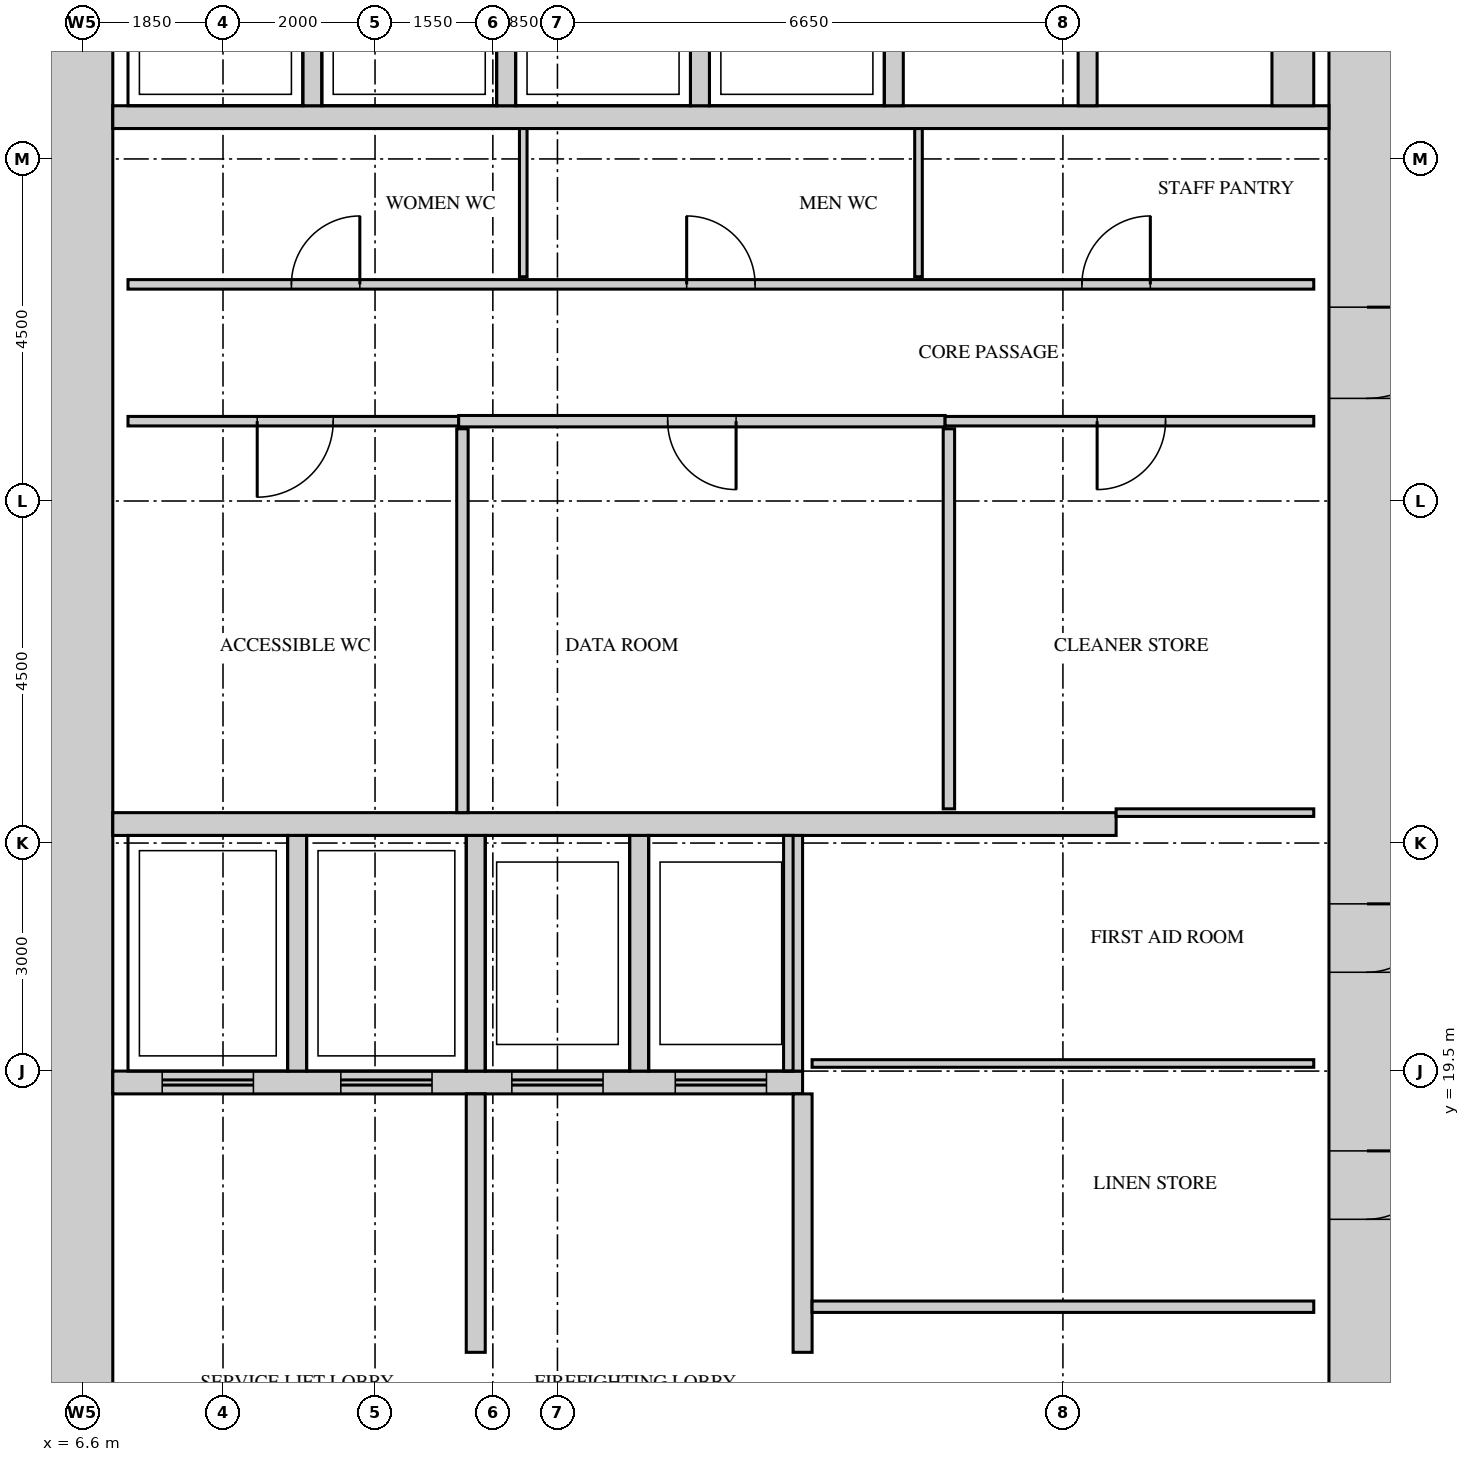
"""IFC4 building model, lengths in metres.
Left out: names, types, materials, properties, quantities, classifications, styles, units other than length and angle.
Written with IfcOpenShell. Run it as: python <this file> out.ifc"""

import sys

from ifc_helpers import new_model, si_unit, direction, frame, frame_2d, origin, place, context, subcontext, project, spatial, rectangle, extrude, source, transform, mapped, element, fill, save


model = new_model("IFC4")
c1 = context("Model", 3, precision=1e-05, world=origin(), true_north=direction((0.0, 1.0)))
c2 = subcontext(c1, "Body", "Model", "MODEL_VIEW")
j1 = project(units=[si_unit("LENGTHUNIT", "METRE"), si_unit("PLANEANGLEUNIT", "RADIAN")], contexts=[c1])
p1 = place(None, origin())
s1 = spatial("IfcSite", under=j1, at=p1, CompositionType="ELEMENT")
p2 = place(p1, origin())
s2 = spatial("IfcBuilding", under=s1, at=p2, CompositionType="ELEMENT")
p3 = place(p2, frame((0.0, 0.0, 132.3)))
s3 = spatial("IfcBuildingStorey", under=s2, at=p3, CompositionType="ELEMENT", Elevation=132.3)
m1 = source(origin(), c2, "Body", "SweptSolid", [
    extrude(rectangle(XDim=28.0, YDim=1.0, at=frame_2d((14.0, 0.0))), origin(), (0.0, 0.0, 1.0), 4.1),
])
p4 = place(p3, frame((23.5, 13.0, 0.0), z_axis=(0.0, 0.0, 1.0), x_axis=(0.0, 1.0, 0.0)))
e1 = element("IfcWall", 1, at=p4, inside=s3, PredefinedType="SHEAR", context=c2, shape_type="MappedRepresentation", body=[
    mapped(m1, transform((0.0, 0.0, 0.0))),
])
m2 = source(origin(), c2, "Body", "SweptSolid", [
    extrude(rectangle(XDim=1.8, YDim=2.1, at=frame_2d((0.9, 1.05))), frame((0.0, 0.51, 0.0), z_axis=(0.0, -1.0, 0.0), x_axis=(1.0, 0.0, 0.0)), (0.0, 0.0, 1.0), 1.02),
])
p5 = place(p4, frame((22.6, 0.0, 0.0)))
e2 = element("IfcOpeningElement", 2, at=p5, cuts=e1, PredefinedType="OPENING", context=c2, shape_type="MappedRepresentation", body=[
    mapped(m2, transform((0.0, 0.0, 0.0))),
])
m3 = source(origin(), c2, "Body", "SweptSolid", [
    extrude(rectangle(XDim=1.2, YDim=2.1, at=frame_2d((0.6, 1.05))), frame((0.0, 0.51, 0.0), z_axis=(0.0, -1.0, 0.0), x_axis=(1.0, 0.0, 0.0)), (0.0, 0.0, 1.0), 1.02),
])
p6 = place(p4, frame((15.35, 0.0, 0.0)))
e3 = element("IfcOpeningElement", 3, at=p6, cuts=e1, PredefinedType="OPENING", context=c2, shape_type="MappedRepresentation", body=[
    mapped(m3, transform((0.0, 0.0, 0.0))),
])
m4 = source(origin(), c2, "Body", "SweptSolid", [
    extrude(rectangle(XDim=0.9, YDim=2.1, at=frame_2d((0.45, 1.05))), frame((0.0, 0.51, 0.0), z_axis=(0.0, -1.0, 0.0), x_axis=(1.0, 0.0, 0.0)), (0.0, 0.0, 1.0), 1.02),
])
p7 = place(p4, frame((1.35, 0.0, 0.0)))
e4 = element("IfcOpeningElement", 4, at=p7, cuts=e1, PredefinedType="OPENING", context=c2, shape_type="MappedRepresentation", body=[
    mapped(m4, transform((0.0, 0.0, 0.0))),
])
p8 = place(p4, frame((4.55, 0.0, 0.0)))
e5 = element("IfcOpeningElement", 5, at=p8, cuts=e1, PredefinedType="OPENING", context=c2, shape_type="MappedRepresentation", body=[
    mapped(m4, transform((0.0, 0.0, 0.0))),
])
p9 = place(p4, frame((7.8, 0.0, 0.0)))
e6 = element("IfcOpeningElement", 6, at=p9, cuts=e1, PredefinedType="OPENING", context=c2, shape_type="MappedRepresentation", body=[
    mapped(m4, transform((0.0, 0.0, 0.0))),
])
p10 = place(p3, frame((6.5, 13.0, 0.0), z_axis=(0.0, 0.0, 1.0), x_axis=(0.0, 1.0, 0.0)))
e7 = element("IfcWall", 7, at=p10, inside=s3, PredefinedType="SHEAR", context=c2, shape_type="MappedRepresentation", body=[
    mapped(m1, transform((0.0, 0.0, 0.0))),
])
m5 = source(origin(), c2, "Body", "SweptSolid", [
    extrude(rectangle(XDim=13.2, YDim=0.3, at=frame_2d((6.6, 0.0))), origin(), (0.0, 0.0, 1.0), 4.1),
])
p11 = place(p3, frame((7.0, 22.75, 0.0), z_axis=(0.0, 0.0, 1.0), x_axis=(1.0, 0.0, 0.0)))
e8 = element("IfcWall", 8, at=p11, inside=s3, PredefinedType="STANDARD", context=c2, shape_type="MappedRepresentation", body=[
    mapped(m5, transform((0.0, 0.0, 0.0))),
])
m6 = source(origin(), c2, "Body", "SweptSolid", [
    extrude(rectangle(XDim=9.075, YDim=0.3, at=frame_2d((4.538, 0.0))), origin(), (0.0, 0.0, 1.0), 4.1),
])
p12 = place(p3, frame((7.0, 19.35, 0.0), z_axis=(0.0, 0.0, 1.0), x_axis=(1.0, 0.0, 0.0)))
e9 = element("IfcWall", 9, at=p12, inside=s3, PredefinedType="STANDARD", context=c2, shape_type="MappedRepresentation", body=[
    mapped(m6, transform((0.0, 0.0, 0.0))),
])
m7 = source(origin(), c2, "Body", "SweptSolid", [
    extrude(rectangle(XDim=1.2, YDim=2.1, at=frame_2d((0.6, 1.05))), frame((0.0, 0.16, 0.0), z_axis=(0.0, -1.0, 0.0), x_axis=(1.0, 0.0, 0.0)), (0.0, 0.0, 1.0), 0.32),
])
p13 = place(p12, frame((0.65, 0.0, 0.0)))
e10 = element("IfcOpeningElement", 10, at=p13, cuts=e9, PredefinedType="OPENING", context=c2, shape_type="MappedRepresentation", body=[
    mapped(m7, transform((0.0, 0.0, 0.0))),
])
p14 = place(p12, frame((3.0, 0.0, 0.0)))
e11 = element("IfcOpeningElement", 11, at=p14, cuts=e9, PredefinedType="OPENING", context=c2, shape_type="MappedRepresentation", body=[
    mapped(m7, transform((0.0, 0.0, 0.0))),
])
p15 = place(p12, frame((5.25, 0.0, 0.0)))
e12 = element("IfcOpeningElement", 12, at=p15, cuts=e9, PredefinedType="OPENING", context=c2, shape_type="MappedRepresentation", body=[
    mapped(m7, transform((0.0, 0.0, 0.0))),
])
p16 = place(p12, frame((7.4, 0.0, 0.0)))
e13 = element("IfcOpeningElement", 13, at=p16, cuts=e9, PredefinedType="OPENING", context=c2, shape_type="MappedRepresentation", body=[
    mapped(m7, transform((0.0, 0.0, 0.0))),
])
m8 = source(origin(), c2, "Body", "SweptSolid", [
    extrude(rectangle(XDim=16.0, YDim=0.3, at=frame_2d((8.0, 0.0))), origin(), (0.0, 0.0, 1.0), 4.1),
])
p17 = place(p3, frame((7.0, 32.05, 0.0), z_axis=(0.0, 0.0, 1.0), x_axis=(1.0, 0.0, 0.0)))
e14 = element("IfcWall", 14, at=p17, inside=s3, PredefinedType="STANDARD", context=c2, shape_type="MappedRepresentation", body=[
    mapped(m8, transform((0.0, 0.0, 0.0))),
])
m9 = source(origin(), c2, "Body", "SweptSolid", [
    extrude(rectangle(XDim=3.1, YDim=0.25, at=frame_2d((1.55, 0.0))), origin(), (0.0, 0.0, 1.0), 4.1),
])
for number, where, z_axis, x_axis in (
    (15, (9.425, 19.5, 0.0), (0.0, 0.0, 1.0), (0.0, 1.0, 0.0)),
    (16, (11.775, 19.5, 0.0), (0.0, 0.0, 1.0), (0.0, 1.0, 0.0)),
    (17, (13.925, 19.5, 0.0), (0.0, 0.0, 1.0), (0.0, 1.0, 0.0)),
    (18, (15.95, 19.5, 0.0), (0.0, 0.0, 1.0), (0.0, 1.0, 0.0)),
):
    element("IfcWall", number, at=place(p3, frame(where, z_axis=z_axis, x_axis=x_axis)), inside=s3, PredefinedType="STANDARD", context=c2, shape_type="MappedRepresentation", body=[
        mapped(m9, transform((0.0, 0.0, 0.0))),
    ])
m10 = source(origin(), c2, "Body", "SweptSolid", [
    extrude(rectangle(XDim=2.4, YDim=0.25, at=frame_2d((1.2, 0.0))), origin(), (0.0, 0.0, 1.0), 4.1),
])
for number, where, z_axis, x_axis in (
    (19, (9.625, 32.2, 0.0), (0.0, 0.0, 1.0), (0.0, 1.0, 0.0)),
    (20, (12.175, 32.2, 0.0), (0.0, 0.0, 1.0), (0.0, 1.0, 0.0)),
    (21, (14.725, 32.2, 0.0), (0.0, 0.0, 1.0), (0.0, 1.0, 0.0)),
    (22, (17.275, 32.2, 0.0), (0.0, 0.0, 1.0), (0.0, 1.0, 0.0)),
    (23, (19.825, 32.2, 0.0), (0.0, 0.0, 1.0), (0.0, 1.0, 0.0)),
):
    element("IfcWall", number, at=place(p3, frame(where, z_axis=z_axis, x_axis=x_axis)), inside=s3, PredefinedType="STANDARD", context=c2, shape_type="MappedRepresentation", body=[
        mapped(m10, transform((0.0, 0.0, 0.0))),
    ])
m11 = source(origin(), c2, "Body", "SweptSolid", [
    extrude(rectangle(XDim=2.4, YDim=0.55, at=frame_2d((1.2, 0.0))), origin(), (0.0, 0.0, 1.0), 4.1),
])
p18 = place(p3, frame((22.525, 32.2, 0.0), z_axis=(0.0, 0.0, 1.0), x_axis=(0.0, 1.0, 0.0)))
e24 = element("IfcWall", 24, at=p18, inside=s3, PredefinedType="STANDARD", context=c2, shape_type="MappedRepresentation", body=[
    mapped(m11, transform((0.0, 0.0, 0.0))),
])
m12 = source(origin(), c2, "Body", "SweptSolid", [
    extrude(rectangle(XDim=3.4, YDim=0.25, at=frame_2d((1.7, 0.0))), origin(), (0.0, 0.0, 1.0), 4.1),
])
for number, where, z_axis, x_axis in (
    (25, (16.075, 15.8, 0.0), (0.0, 0.0, 1.0), (0.0, 1.0, 0.0)),
    (26, (11.775, 15.8, 0.0), (0.0, 0.0, 1.0), (0.0, 1.0, 0.0)),
):
    element("IfcWall", number, at=place(p3, frame(where, z_axis=z_axis, x_axis=x_axis)), inside=s3, PredefinedType="STANDARD", context=c2, shape_type="MappedRepresentation", body=[
        mapped(m12, transform((0.0, 0.0, 0.0))),
    ])
m13 = source(origin(), c2, "Body", "SweptSolid", [
    extrude(rectangle(XDim=6.6, YDim=0.15, at=frame_2d((3.3, 0.0))), origin(), (0.0, 0.0, 1.0), 4.2),
])
p19 = place(p3, frame((16.2, 16.4, 0.0), z_axis=(0.0, 0.0, 1.0), x_axis=(1.0, 0.0, 0.0)))
e27 = element("IfcWall", 27, at=p19, inside=s3, PredefinedType="PARTITIONING", context=c2, shape_type="MappedRepresentation", body=[
    mapped(m13, transform((0.0, 0.0, 0.0))),
])
m14 = source(origin(), c2, "Body", "SweptSolid", [
    extrude(rectangle(XDim=6.6, YDim=0.1, at=frame_2d((3.3, 0.0))), origin(), (0.0, 0.0, 1.0), 4.2),
])
p20 = place(p3, frame((16.2, 19.6, 0.0), z_axis=(0.0, 0.0, 1.0), x_axis=(1.0, 0.0, 0.0)))
e28 = element("IfcWall", 28, at=p20, inside=s3, PredefinedType="PARTITIONING", context=c2, shape_type="MappedRepresentation", body=[
    mapped(m14, transform((0.0, 0.0, 0.0))),
])
m15 = source(origin(), c2, "Body", "SweptSolid", [
    extrude(rectangle(XDim=5.05, YDim=0.15, at=frame_2d((2.525, 0.0))), origin(), (0.0, 0.0, 1.0), 4.2),
])
p21 = place(p3, frame((11.6, 22.9, 0.0), z_axis=(0.0, 0.0, 1.0), x_axis=(0.0, 1.0, 0.0)))
e29 = element("IfcWall", 29, at=p21, inside=s3, PredefinedType="PARTITIONING", context=c2, shape_type="MappedRepresentation", body=[
    mapped(m15, transform((0.0, 0.0, 0.0))),
])
m16 = source(origin(), c2, "Body", "SweptSolid", [
    extrude(rectangle(XDim=2.6, YDim=0.1, at=frame_2d((1.3, 0.0))), origin(), (0.0, 0.0, 1.0), 4.2),
])
p22 = place(p3, frame((20.2, 22.9, 0.0), z_axis=(0.0, 0.0, 1.0), x_axis=(1.0, 0.0, 0.0)))
e30 = element("IfcWall", 30, at=p22, inside=s3, PredefinedType="PARTITIONING", context=c2, shape_type="MappedRepresentation", body=[
    mapped(m16, transform((0.0, 0.0, 0.0))),
])
m17 = source(origin(), c2, "Body", "SweptSolid", [
    extrude(rectangle(XDim=5.0, YDim=0.15, at=frame_2d((2.5, 0.0))), origin(), (0.0, 0.0, 1.0), 4.2),
])
p23 = place(p3, frame((18.0, 22.95, 0.0), z_axis=(0.0, 0.0, 1.0), x_axis=(0.0, 1.0, 0.0)))
e31 = element("IfcWall", 31, at=p23, inside=s3, PredefinedType="PARTITIONING", context=c2, shape_type="MappedRepresentation", body=[
    mapped(m17, transform((0.0, 0.0, 0.0))),
])
m18 = source(origin(), c2, "Body", "SweptSolid", [
    extrude(rectangle(XDim=4.35, YDim=0.125, at=frame_2d((2.175, 0.0))), origin(), (0.0, 0.0, 1.0), 4.2),
])
p24 = place(p3, frame((7.2, 28.05, 0.0), z_axis=(0.0, 0.0, 1.0), x_axis=(1.0, 0.0, 0.0)))
e32 = element("IfcWall", 32, at=p24, inside=s3, PredefinedType="PARTITIONING", context=c2, shape_type="MappedRepresentation", body=[
    mapped(m18, transform((0.0, 0.0, 0.0))),
])
m19 = source(origin(), c2, "Body", "SweptSolid", [
    extrude(rectangle(XDim=1.0, YDim=2.1, at=frame_2d((0.5, 1.05))), frame((0.0, 0.073, 0.0), z_axis=(0.0, -1.0, 0.0), x_axis=(1.0, 0.0, 0.0)), (0.0, 0.0, 1.0), 0.145),
])
p25 = place(p24, frame((1.7, 0.0, 0.0)))
e33 = element("IfcOpeningElement", 33, at=p25, cuts=e32, PredefinedType="OPENING", context=c2, shape_type="MappedRepresentation", body=[
    mapped(m19, transform((0.0, 0.0, 0.0))),
])
m20 = source(origin(), c2, "Body", "SweptSolid", [
    extrude(rectangle(XDim=6.4, YDim=0.15, at=frame_2d((3.2, 0.0))), origin(), (0.0, 0.0, 1.0), 4.2),
])
p26 = place(p3, frame((11.55, 28.05, 0.0), z_axis=(0.0, 0.0, 1.0), x_axis=(1.0, 0.0, 0.0)))
e34 = element("IfcWall", 34, at=p26, inside=s3, PredefinedType="PARTITIONING", context=c2, shape_type="MappedRepresentation", body=[
    mapped(m20, transform((0.0, 0.0, 0.0))),
])
m21 = source(origin(), c2, "Body", "SweptSolid", [
    extrude(rectangle(XDim=0.9, YDim=2.1, at=frame_2d((0.45, 1.05))), frame((0.0, 0.085, 0.0), z_axis=(0.0, -1.0, 0.0), x_axis=(1.0, 0.0, 0.0)), (0.0, 0.0, 1.0), 0.17),
])
p27 = place(p26, frame((2.75, 0.0, 0.0)))
e35 = element("IfcOpeningElement", 35, at=p27, cuts=e34, PredefinedType="OPENING", context=c2, shape_type="MappedRepresentation", body=[
    mapped(m21, transform((0.0, 0.0, 0.0))),
])
m22 = source(origin(), c2, "Body", "SweptSolid", [
    extrude(rectangle(XDim=4.85, YDim=0.125, at=frame_2d((2.425, 0.0))), origin(), (0.0, 0.0, 1.0), 4.2),
])
p28 = place(p3, frame((17.95, 28.05, 0.0), z_axis=(0.0, 0.0, 1.0), x_axis=(1.0, 0.0, 0.0)))
e36 = element("IfcWall", 36, at=p28, inside=s3, PredefinedType="PARTITIONING", context=c2, shape_type="MappedRepresentation", body=[
    mapped(m22, transform((0.0, 0.0, 0.0))),
])
m23 = source(origin(), c2, "Body", "SweptSolid", [
    extrude(rectangle(XDim=0.9, YDim=2.1, at=frame_2d((0.45, 1.05))), frame((0.0, 0.073, 0.0), z_axis=(0.0, -1.0, 0.0), x_axis=(1.0, 0.0, 0.0)), (0.0, 0.0, 1.0), 0.145),
])
p29 = place(p28, frame((2.0, 0.0, 0.0)))
e37 = element("IfcOpeningElement", 37, at=p29, cuts=e36, PredefinedType="OPENING", context=c2, shape_type="MappedRepresentation", body=[
    mapped(m23, transform((0.0, 0.0, 0.0))),
])
m24 = source(origin(), c2, "Body", "SweptSolid", [
    extrude(rectangle(XDim=15.6, YDim=0.125, at=frame_2d((7.8, 0.0))), origin(), (0.0, 0.0, 1.0), 4.2),
])
p30 = place(p3, frame((7.2, 29.85, 0.0), z_axis=(0.0, 0.0, 1.0), x_axis=(1.0, 0.0, 0.0)))
e38 = element("IfcWall", 38, at=p30, inside=s3, PredefinedType="PARTITIONING", context=c2, shape_type="MappedRepresentation", body=[
    mapped(m24, transform((0.0, 0.0, 0.0))),
])
p31 = place(p30, frame((2.15, 0.0, 0.0)))
e39 = element("IfcOpeningElement", 39, at=p31, cuts=e38, PredefinedType="OPENING", context=c2, shape_type="MappedRepresentation", body=[
    mapped(m23, transform((0.0, 0.0, 0.0))),
])
p32 = place(p30, frame((7.35, 0.0, 0.0)))
e40 = element("IfcOpeningElement", 40, at=p32, cuts=e38, PredefinedType="OPENING", context=c2, shape_type="MappedRepresentation", body=[
    mapped(m23, transform((0.0, 0.0, 0.0))),
])
p33 = place(p30, frame((12.55, 0.0, 0.0)))
e41 = element("IfcOpeningElement", 41, at=p33, cuts=e38, PredefinedType="OPENING", context=c2, shape_type="MappedRepresentation", body=[
    mapped(m23, transform((0.0, 0.0, 0.0))),
])
m25 = source(origin(), c2, "Body", "SweptSolid", [
    extrude(rectangle(XDim=1.95, YDim=0.1, at=frame_2d((0.975, 0.0))), origin(), (0.0, 0.0, 1.0), 4.2),
])
for number, where, z_axis, x_axis in (
    (42, (12.4, 29.95, 0.0), (0.0, 0.0, 1.0), (0.0, 1.0, 0.0)),
    (43, (17.6, 29.95, 0.0), (0.0, 0.0, 1.0), (0.0, 1.0, 0.0)),
):
    element("IfcWall", number, at=place(p3, frame(where, z_axis=z_axis, x_axis=x_axis)), inside=s3, PredefinedType="PARTITIONING", context=c2, shape_type="MappedRepresentation", body=[
        mapped(m25, transform((0.0, 0.0, 0.0))),
    ])
m26 = source(origin(), c2, "Body", "SweptSolid", [
    extrude(rectangle(XDim=1.2, YDim=2.1, at=frame_2d((0.6, 1.05))), frame((0.0, 0.45, 0.0), z_axis=(0.0, -1.0, 0.0), x_axis=(1.0, 0.0, 0.0)), (0.0, 0.0, 1.0), 0.9),
])
p34 = place(p6, origin())
e44 = element("IfcDoor", 44, at=p34, inside=s3, OperationType="SINGLE_SWING_RIGHT", PredefinedType="DOOR", context=c2, shape_type="MappedRepresentation", body=[
    mapped(m26, transform((0.0, 0.0, 0.0))),
])
fill(e3, e44)
m27 = source(origin(), c2, "Body", "SweptSolid", [
    extrude(rectangle(XDim=0.9, YDim=2.1, at=frame_2d((0.45, 1.05))), frame((0.0, 0.025, 0.0), z_axis=(0.0, -1.0, 0.0), x_axis=(1.0, 0.0, 0.0)), (0.0, 0.0, 1.0), 0.05),
])
p35 = place(p31, origin())
e45 = element("IfcDoor", 45, at=p35, inside=s3, OperationType="SINGLE_SWING_LEFT", PredefinedType="DOOR", context=c2, shape_type="MappedRepresentation", body=[
    mapped(m27, transform((0.0, 0.0, 0.0))),
])
fill(e39, e45)
p36 = place(p32, origin())
e46 = element("IfcDoor", 46, at=p36, inside=s3, OperationType="SINGLE_SWING_RIGHT", PredefinedType="DOOR", context=c2, shape_type="MappedRepresentation", body=[
    mapped(m27, transform((0.0, 0.0, 0.0))),
])
fill(e40, e46)
p37 = place(p33, origin())
e47 = element("IfcDoor", 47, at=p37, inside=s3, OperationType="SINGLE_SWING_LEFT", PredefinedType="DOOR", context=c2, shape_type="MappedRepresentation", body=[
    mapped(m27, transform((0.0, 0.0, 0.0))),
])
fill(e41, e47)
m28 = source(origin(), c2, "Body", "SweptSolid", [
    extrude(rectangle(XDim=1.0, YDim=2.1, at=frame_2d((0.5, 1.05))), frame((0.0, 0.025, 0.0), z_axis=(0.0, -1.0, 0.0), x_axis=(1.0, 0.0, 0.0)), (0.0, 0.0, 1.0), 0.05),
])
p38 = place(p25, origin())
e48 = element("IfcDoor", 48, at=p38, inside=s3, OperationType="SINGLE_SWING_LEFT", PredefinedType="DOOR", context=c2, shape_type="MappedRepresentation", body=[
    mapped(m28, transform((0.0, 0.0, 0.0))),
])
fill(e33, e48)
p39 = place(p27, origin())
e49 = element("IfcDoor", 49, at=p39, inside=s3, OperationType="SINGLE_SWING_RIGHT", PredefinedType="DOOR", context=c2, shape_type="MappedRepresentation", body=[
    mapped(m27, transform((0.0, 0.0, 0.0))),
])
fill(e35, e49)
p40 = place(p29, origin())
e50 = element("IfcDoor", 50, at=p40, inside=s3, OperationType="SINGLE_SWING_LEFT", PredefinedType="DOOR", context=c2, shape_type="MappedRepresentation", body=[
    mapped(m27, transform((0.0, 0.0, 0.0))),
])
fill(e37, e50)
m29 = source(origin(), c2, "Body", "SweptSolid", [
    extrude(rectangle(XDim=0.9, YDim=2.1, at=frame_2d((0.45, 1.05))), frame((0.0, 0.45, 0.0), z_axis=(0.0, -1.0, 0.0), x_axis=(1.0, 0.0, 0.0)), (0.0, 0.0, 1.0), 0.9),
])
p41 = place(p8, origin())
e51 = element("IfcDoor", 51, at=p41, inside=s3, OperationType="SINGLE_SWING_RIGHT", PredefinedType="DOOR", context=c2, shape_type="MappedRepresentation", body=[
    mapped(m29, transform((0.0, 0.0, 0.0))),
])
fill(e5, e51)
p42 = place(p9, origin())
e52 = element("IfcDoor", 52, at=p42, inside=s3, OperationType="SINGLE_SWING_RIGHT", PredefinedType="DOOR", context=c2, shape_type="MappedRepresentation", body=[
    mapped(m29, transform((0.0, 0.0, 0.0))),
])
fill(e6, e52)
m30 = source(origin(), c2, "Body", "SweptSolid", [
    extrude(rectangle(XDim=1.2, YDim=2.1, at=frame_2d((0.6, 1.05))), frame((0.0, 0.025, 0.0), z_axis=(0.0, -1.0, 0.0), x_axis=(1.0, 0.0, 0.0)), (0.0, 0.0, 1.0), 0.05),
])
p43 = place(p13, origin())
e53 = element("IfcDoor", 53, at=p43, inside=s3, OperationType="DOUBLE_DOOR_SLIDING", PredefinedType="DOOR", context=c2, shape_type="MappedRepresentation", body=[
    mapped(m30, transform((0.0, 0.0, 0.0))),
])
fill(e10, e53)
p44 = place(p14, origin())
e54 = element("IfcDoor", 54, at=p44, inside=s3, OperationType="DOUBLE_DOOR_SLIDING", PredefinedType="DOOR", context=c2, shape_type="MappedRepresentation", body=[
    mapped(m30, transform((0.0, 0.0, 0.0))),
])
fill(e11, e54)
p45 = place(p15, origin())
e55 = element("IfcDoor", 55, at=p45, inside=s3, OperationType="DOUBLE_DOOR_SLIDING", PredefinedType="DOOR", context=c2, shape_type="MappedRepresentation", body=[
    mapped(m30, transform((0.0, 0.0, 0.0))),
])
fill(e12, e55)
p46 = place(p16, origin())
e56 = element("IfcDoor", 56, at=p46, inside=s3, OperationType="DOUBLE_DOOR_SLIDING", PredefinedType="DOOR", context=c2, shape_type="MappedRepresentation", body=[
    mapped(m30, transform((0.0, 0.0, 0.0))),
])
fill(e13, e56)
save(model, sys.argv[1])
